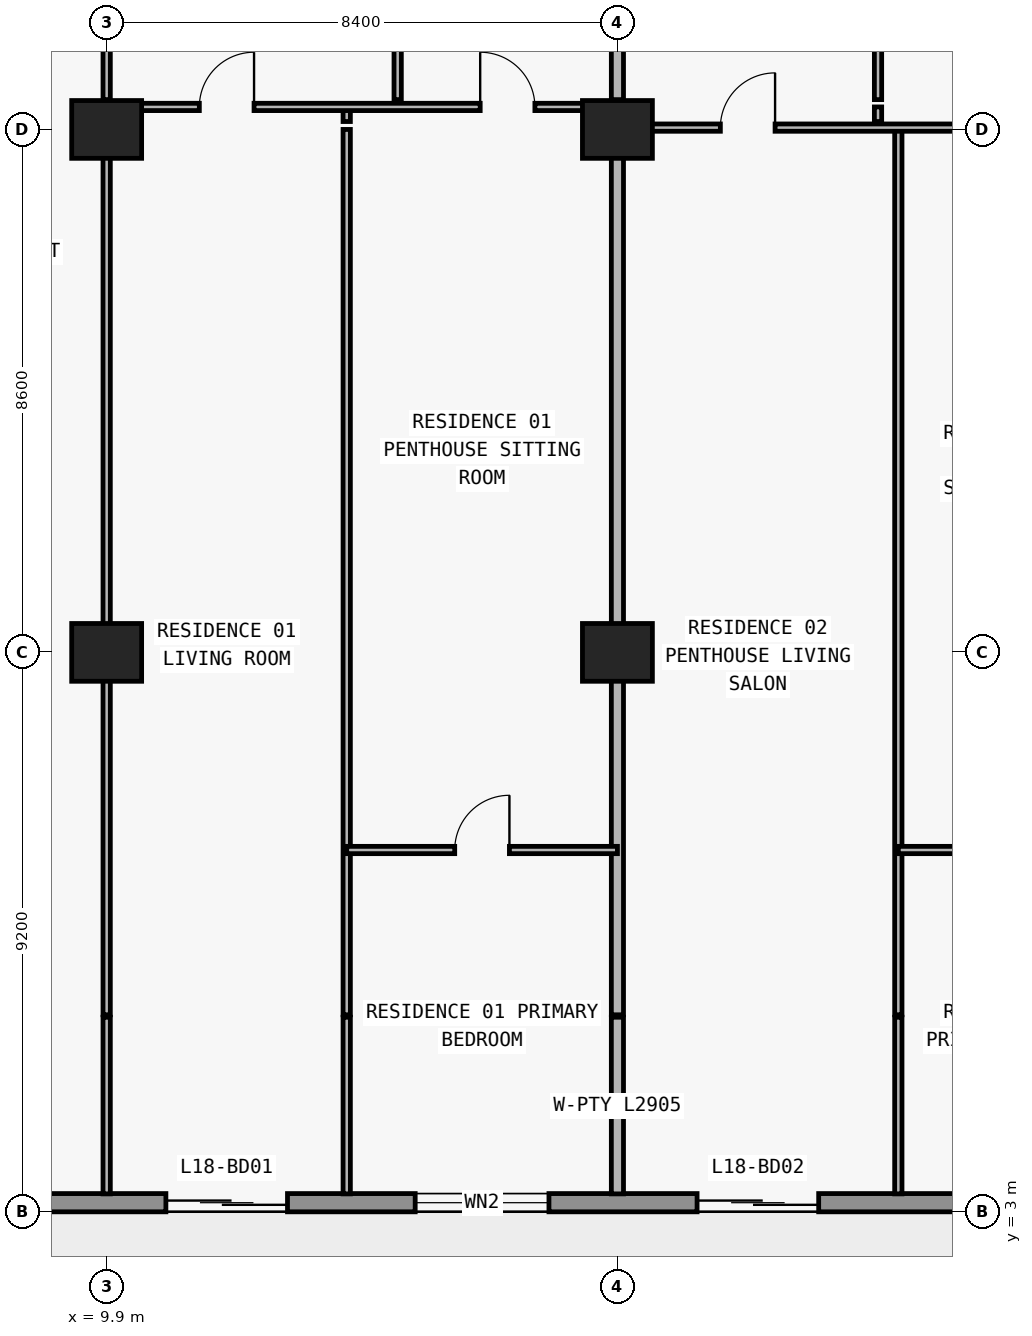
"""IFC4 building model, lengths in metres.
Left out: names, types, materials, properties, quantities, classifications, styles, units other than length and angle.
Written with IfcOpenShell. Run it as: python <this file> out.ifc"""

import sys

from ifc_helpers import new_model, si_unit, direction, frame, frame_2d, origin, origin_2d, place, context, subcontext, project, spatial, rectangle, extrude, element, fill, save


model = new_model("IFC4")
c1 = context("Model", 3, precision=1e-05, world=origin(), true_north=direction((0.0, 1.0)))
c2 = subcontext(c1, "Body", "Model", "MODEL_VIEW")
j1 = project(units=[si_unit("LENGTHUNIT", "METRE"), si_unit("PLANEANGLEUNIT", "RADIAN")], contexts=[c1])
p1 = place(None, origin())
s1 = spatial("IfcSite", under=j1, at=p1, CompositionType="ELEMENT")
p2 = place(p1, origin())
s2 = spatial("IfcBuilding", under=s1, at=p2, CompositionType="ELEMENT")
p3 = place(p2, frame((0.0, 0.0, 69.6)))
s3 = spatial("IfcBuildingStorey", under=s2, at=p3, CompositionType="ELEMENT", Elevation=69.6)
for number, where, z_axis, x_axis in (
    (1, (9.9, 12.2, 0.0), (0.0, 0.0, 1.0), (1.0, 0.0, 0.0)),
    (2, (18.3, 12.2, 0.0), (0.0, 0.0, 1.0), (1.0, 0.0, 0.0)),
    (3, (9.9, 20.8, 0.0), (0.0, 0.0, 1.0), (1.0, 0.0, 0.0)),
    (4, (18.3, 20.8, 0.0), (0.0, 0.0, 1.0), (1.0, 0.0, 0.0)),
):
    element("IfcColumn", number, at=place(p3, frame(where, z_axis=z_axis, x_axis=x_axis)), inside=s3, PredefinedType="COLUMN", context=c2, shape_type="SweptSolid", body=[
        extrude(rectangle(XDim=1.15, YDim=0.95, at=origin_2d()), origin(), (0.0, 0.0, 1.0), 3.05),
    ])
p4 = place(p3, frame((72.7, 3.15, 0.0), z_axis=(0.0, 0.0, 1.0), x_axis=(-1.0, 0.0, 0.0)))
e5 = element("IfcWall", 5, at=p4, inside=s3, PredefinedType="STANDARD", context=c2, shape_type="SweptSolid", body=[
    extrude(rectangle(XDim=67.6, YDim=0.3, at=frame_2d((33.8, 0.0))), origin(), (0.0, 0.0, 1.0), 3.05),
])
p5 = place(p4, frame((59.826, 0.0, 0.0)))
e6 = element("IfcOpeningElement", 6, at=p5, cuts=e5, PredefinedType="OPENING", context=c2, shape_type="SweptSolid", body=[
    extrude(rectangle(XDim=2.0, YDim=2.3, at=frame_2d((1.0, 1.15))), frame((0.0, 0.16, 0.0), z_axis=(0.0, -1.0, 0.0), x_axis=(1.0, 0.0, 0.0)), (0.0, 0.0, 1.0), 0.32),
])
p6 = place(p4, frame((55.526, 0.0, 0.85)))
e7 = element("IfcOpeningElement", 7, at=p6, cuts=e5, PredefinedType="OPENING", context=c2, shape_type="SweptSolid", body=[
    extrude(rectangle(XDim=2.2, YDim=1.55, at=frame_2d((1.1, 0.775))), frame((0.0, 0.16, 0.0), z_axis=(0.0, -1.0, 0.0), x_axis=(1.0, 0.0, 0.0)), (0.0, 0.0, 1.0), 0.32),
])
p7 = place(p4, frame((51.09, 0.0, 0.0)))
e8 = element("IfcOpeningElement", 8, at=p7, cuts=e5, PredefinedType="OPENING", context=c2, shape_type="SweptSolid", body=[
    extrude(rectangle(XDim=2.0, YDim=2.3, at=frame_2d((1.0, 1.15))), frame((0.0, 0.16, 0.0), z_axis=(0.0, -1.0, 0.0), x_axis=(1.0, 0.0, 0.0)), (0.0, 0.0, 1.0), 0.32),
])
p8 = place(p4, frame((46.99, 0.0, 0.85)))
e9 = element("IfcOpeningElement", 9, at=p8, cuts=e5, PredefinedType="OPENING", context=c2, shape_type="SweptSolid", body=[
    extrude(rectangle(XDim=1.8, YDim=1.55, at=frame_2d((0.9, 0.775))), frame((0.0, 0.16, 0.0), z_axis=(0.0, -1.0, 0.0), x_axis=(1.0, 0.0, 0.0)), (0.0, 0.0, 1.0), 0.32),
])
p9 = place(p4, frame((43.026, 0.0, 0.0)))
e10 = element("IfcOpeningElement", 10, at=p9, cuts=e5, PredefinedType="OPENING", context=c2, shape_type="SweptSolid", body=[
    extrude(rectangle(XDim=2.0, YDim=2.3, at=frame_2d((1.0, 1.15))), frame((0.0, 0.16, 0.0), z_axis=(0.0, -1.0, 0.0), x_axis=(1.0, 0.0, 0.0)), (0.0, 0.0, 1.0), 0.32),
])
p10 = place(p4, frame((38.726, 0.0, 0.85)))
e11 = element("IfcOpeningElement", 11, at=p10, cuts=e5, PredefinedType="OPENING", context=c2, shape_type="SweptSolid", body=[
    extrude(rectangle(XDim=2.2, YDim=1.55, at=frame_2d((1.1, 0.775))), frame((0.0, 0.16, 0.0), z_axis=(0.0, -1.0, 0.0), x_axis=(1.0, 0.0, 0.0)), (0.0, 0.0, 1.0), 0.32),
])
p11 = place(p4, frame((34.51, 0.0, 0.0)))
e12 = element("IfcOpeningElement", 12, at=p11, cuts=e5, PredefinedType="OPENING", context=c2, shape_type="SweptSolid", body=[
    extrude(rectangle(XDim=2.0, YDim=2.3, at=frame_2d((1.0, 1.15))), frame((0.0, 0.16, 0.0), z_axis=(0.0, -1.0, 0.0), x_axis=(1.0, 0.0, 0.0)), (0.0, 0.0, 1.0), 0.32),
])
p12 = place(p4, frame((30.81, 0.0, 0.85)))
e13 = element("IfcOpeningElement", 13, at=p12, cuts=e5, PredefinedType="OPENING", context=c2, shape_type="SweptSolid", body=[
    extrude(rectangle(XDim=1.8, YDim=1.55, at=frame_2d((0.9, 0.775))), frame((0.0, 0.16, 0.0), z_axis=(0.0, -1.0, 0.0), x_axis=(1.0, 0.0, 0.0)), (0.0, 0.0, 1.0), 0.32),
])
p13 = place(p4, frame((27.026, 0.0, 0.0)))
e14 = element("IfcOpeningElement", 14, at=p13, cuts=e5, PredefinedType="OPENING", context=c2, shape_type="SweptSolid", body=[
    extrude(rectangle(XDim=2.0, YDim=2.3, at=frame_2d((1.0, 1.15))), frame((0.0, 0.16, 0.0), z_axis=(0.0, -1.0, 0.0), x_axis=(1.0, 0.0, 0.0)), (0.0, 0.0, 1.0), 0.32),
])
p14 = place(p4, frame((22.726, 0.0, 0.85)))
e15 = element("IfcOpeningElement", 15, at=p14, cuts=e5, PredefinedType="OPENING", context=c2, shape_type="SweptSolid", body=[
    extrude(rectangle(XDim=2.2, YDim=1.55, at=frame_2d((1.1, 0.775))), frame((0.0, 0.16, 0.0), z_axis=(0.0, -1.0, 0.0), x_axis=(1.0, 0.0, 0.0)), (0.0, 0.0, 1.0), 0.32),
])
p15 = place(p4, frame((18.29, 0.0, 0.0)))
e16 = element("IfcOpeningElement", 16, at=p15, cuts=e5, PredefinedType="OPENING", context=c2, shape_type="SweptSolid", body=[
    extrude(rectangle(XDim=2.0, YDim=2.3, at=frame_2d((1.0, 1.15))), frame((0.0, 0.16, 0.0), z_axis=(0.0, -1.0, 0.0), x_axis=(1.0, 0.0, 0.0)), (0.0, 0.0, 1.0), 0.32),
])
p16 = place(p4, frame((14.19, 0.0, 0.85)))
e17 = element("IfcOpeningElement", 17, at=p16, cuts=e5, PredefinedType="OPENING", context=c2, shape_type="SweptSolid", body=[
    extrude(rectangle(XDim=1.8, YDim=1.55, at=frame_2d((0.9, 0.775))), frame((0.0, 0.16, 0.0), z_axis=(0.0, -1.0, 0.0), x_axis=(1.0, 0.0, 0.0)), (0.0, 0.0, 1.0), 0.32),
])
p17 = place(p4, frame((10.226, 0.0, 0.0)))
e18 = element("IfcOpeningElement", 18, at=p17, cuts=e5, PredefinedType="OPENING", context=c2, shape_type="SweptSolid", body=[
    extrude(rectangle(XDim=2.0, YDim=2.3, at=frame_2d((1.0, 1.15))), frame((0.0, 0.16, 0.0), z_axis=(0.0, -1.0, 0.0), x_axis=(1.0, 0.0, 0.0)), (0.0, 0.0, 1.0), 0.32),
])
p18 = place(p4, frame((5.926, 0.0, 0.85)))
e19 = element("IfcOpeningElement", 19, at=p18, cuts=e5, PredefinedType="OPENING", context=c2, shape_type="SweptSolid", body=[
    extrude(rectangle(XDim=2.2, YDim=1.55, at=frame_2d((1.1, 0.775))), frame((0.0, 0.16, 0.0), z_axis=(0.0, -1.0, 0.0), x_axis=(1.0, 0.0, 0.0)), (0.0, 0.0, 1.0), 0.32),
])
p19 = place(p3, frame((9.9, 3.295, 0.0), z_axis=(0.0, 0.0, 1.0), x_axis=(0.0, 1.0, 0.0)))
e20 = element("IfcWall", 20, at=p19, inside=s3, PredefinedType="PARTITIONING", context=c2, shape_type="SweptSolid", body=[
    extrude(rectangle(XDim=2.905, YDim=0.12, at=frame_2d((1.453, 0.0))), origin(), (0.0, 0.0, 1.0), 3.05),
])
p20 = place(p3, frame((9.9, 6.24, 0.0), z_axis=(0.0, 0.0, 1.0), x_axis=(0.0, 1.0, 0.0)))
e21 = element("IfcWall", 21, at=p20, inside=s3, PredefinedType="PARTITIONING", context=c2, shape_type="SweptSolid", body=[
    extrude(rectangle(XDim=14.56, YDim=0.12, at=frame_2d((7.28, 0.0))), origin(), (0.0, 0.0, 1.0), 2.11),
])
p21 = place(p3, frame((9.9, 20.93, 0.0), z_axis=(0.0, 0.0, 1.0), x_axis=(0.0, 1.0, 0.0)))
e22 = element("IfcWall", 22, at=p21, inside=s3, PredefinedType="PARTITIONING", context=c2, shape_type="SweptSolid", body=[
    extrude(rectangle(XDim=0.24, YDim=0.12, at=frame_2d((0.12, 0.0))), origin(), (0.0, 0.0, 1.0), 3.05),
])
p22 = place(p3, frame((9.9, 21.29, 0.0), z_axis=(0.0, 0.0, 1.0), x_axis=(0.0, 1.0, 0.0)))
e23 = element("IfcWall", 23, at=p22, inside=s3, PredefinedType="PARTITIONING", context=c2, shape_type="SweptSolid", body=[
    extrude(rectangle(XDim=4.69, YDim=0.12, at=frame_2d((2.345, 0.0))), origin(), (0.0, 0.0, 1.0), 2.11),
])
p23 = place(p22, frame((1.895, 0.0, 0.0)))
e24 = element("IfcOpeningElement", 24, at=p23, cuts=e23, PredefinedType="OPENING", context=c2, shape_type="SweptSolid", body=[
    extrude(rectangle(XDim=0.9, YDim=2.06, at=frame_2d((0.45, 1.03))), frame((0.0, 0.07, 0.0), z_axis=(0.0, -1.0, 0.0), x_axis=(1.0, 0.0, 0.0)), (0.0, 0.0, 1.0), 0.14),
])
p24 = place(p3, frame((13.848, 3.295, 0.0), z_axis=(0.0, 0.0, 1.0), x_axis=(0.0, 1.0, 0.0)))
e25 = element("IfcWall", 25, at=p24, inside=s3, PredefinedType="PARTITIONING", context=c2, shape_type="SweptSolid", body=[
    extrude(rectangle(XDim=2.905, YDim=0.12, at=frame_2d((1.453, 0.0))), origin(), (0.0, 0.0, 1.0), 3.05),
])
p25 = place(p3, frame((13.848, 6.24, 0.0), z_axis=(0.0, 0.0, 1.0), x_axis=(0.0, 1.0, 0.0)))
e26 = element("IfcWall", 26, at=p25, inside=s3, PredefinedType="PARTITIONING", context=c2, shape_type="SweptSolid", body=[
    extrude(rectangle(XDim=14.56, YDim=0.12, at=frame_2d((7.28, 0.0))), origin(), (0.0, 0.0, 1.0), 3.05),
])
p26 = place(p3, frame((13.848, 20.93, 0.0), z_axis=(0.0, 0.0, 1.0), x_axis=(0.0, 1.0, 0.0)))
e27 = element("IfcWall", 27, at=p26, inside=s3, PredefinedType="PARTITIONING", context=c2, shape_type="SweptSolid", body=[
    extrude(rectangle(XDim=0.24, YDim=0.12, at=frame_2d((0.12, 0.0))), origin(), (0.0, 0.0, 1.0), 3.05),
])
p27 = place(p3, frame((14.686, 21.29, 0.0), z_axis=(0.0, 0.0, 1.0), x_axis=(0.0, 1.0, 0.0)))
e28 = element("IfcWall", 28, at=p27, inside=s3, PredefinedType="PARTITIONING", context=c2, shape_type="SweptSolid", body=[
    extrude(rectangle(XDim=4.69, YDim=0.12, at=frame_2d((2.345, 0.0))), origin(), (0.0, 0.0, 1.0), 3.05),
])
p28 = place(p27, frame((1.895, 0.0, 0.0)))
e29 = element("IfcOpeningElement", 29, at=p28, cuts=e28, PredefinedType="OPENING", context=c2, shape_type="SweptSolid", body=[
    extrude(rectangle(XDim=0.9, YDim=2.15, at=frame_2d((0.45, 1.075))), frame((0.0, 0.07, 0.0), z_axis=(0.0, -1.0, 0.0), x_axis=(1.0, 0.0, 0.0)), (0.0, 0.0, 1.0), 0.14),
])
p29 = place(p3, frame((18.3, 3.295, 0.0), z_axis=(0.0, 0.0, 1.0), x_axis=(0.0, 1.0, 0.0)))
e30 = element("IfcWall", 30, at=p29, inside=s3, PredefinedType="PARTITIONING", context=c2, shape_type="SweptSolid", body=[
    extrude(rectangle(XDim=2.905, YDim=0.2, at=frame_2d((1.453, 0.0))), origin(), (0.0, 0.0, 1.0), 3.05),
])
p30 = place(p3, frame((18.3, 6.24, 0.0), z_axis=(0.0, 0.0, 1.0), x_axis=(0.0, 1.0, 0.0)))
e31 = element("IfcWall", 31, at=p30, inside=s3, PredefinedType="PARTITIONING", context=c2, shape_type="SweptSolid", body=[
    extrude(rectangle(XDim=14.56, YDim=0.2, at=frame_2d((7.28, 0.0))), origin(), (0.0, 0.0, 1.0), 2.11),
])
p31 = place(p3, frame((18.3, 20.93, 0.0), z_axis=(0.0, 0.0, 1.0), x_axis=(0.0, 1.0, 0.0)))
e32 = element("IfcWall", 32, at=p31, inside=s3, PredefinedType="PARTITIONING", context=c2, shape_type="SweptSolid", body=[
    extrude(rectangle(XDim=0.24, YDim=0.2, at=frame_2d((0.12, 0.0))), origin(), (0.0, 0.0, 1.0), 3.05),
])
p32 = place(p3, frame((18.3, 21.29, 0.0), z_axis=(0.0, 0.0, 1.0), x_axis=(0.0, 1.0, 0.0)))
e33 = element("IfcWall", 33, at=p32, inside=s3, PredefinedType="PARTITIONING", context=c2, shape_type="SweptSolid", body=[
    extrude(rectangle(XDim=4.69, YDim=0.2, at=frame_2d((2.345, 0.0))), origin(), (0.0, 0.0, 1.0), 2.11),
])
p33 = place(p3, frame((22.586, 20.93, 0.0), z_axis=(0.0, 0.0, 1.0), x_axis=(0.0, 1.0, 0.0)))
e34 = element("IfcWall", 34, at=p33, inside=s3, PredefinedType="PARTITIONING", context=c2, shape_type="SweptSolid", body=[
    extrude(rectangle(XDim=0.24, YDim=0.12, at=frame_2d((0.12, 0.0))), origin(), (0.0, 0.0, 1.0), 3.05),
])
p34 = place(p3, frame((22.586, 21.29, 0.0), z_axis=(0.0, 0.0, 1.0), x_axis=(0.0, 1.0, 0.0)))
e35 = element("IfcWall", 35, at=p34, inside=s3, PredefinedType="PARTITIONING", context=c2, shape_type="SweptSolid", body=[
    extrude(rectangle(XDim=4.69, YDim=0.12, at=frame_2d((2.345, 0.0))), origin(), (0.0, 0.0, 1.0), 3.05),
])
p35 = place(p34, frame((1.895, 0.0, 0.0)))
e36 = element("IfcOpeningElement", 36, at=p35, cuts=e35, PredefinedType="OPENING", context=c2, shape_type="SweptSolid", body=[
    extrude(rectangle(XDim=0.9, YDim=2.15, at=frame_2d((0.45, 1.075))), frame((0.0, 0.07, 0.0), z_axis=(0.0, -1.0, 0.0), x_axis=(1.0, 0.0, 0.0)), (0.0, 0.0, 1.0), 0.14),
])
p36 = place(p3, frame((22.92, 3.295, 0.0), z_axis=(0.0, 0.0, 1.0), x_axis=(0.0, 1.0, 0.0)))
e37 = element("IfcWall", 37, at=p36, inside=s3, PredefinedType="PARTITIONING", context=c2, shape_type="SweptSolid", body=[
    extrude(rectangle(XDim=2.905, YDim=0.12, at=frame_2d((1.453, 0.0))), origin(), (0.0, 0.0, 1.0), 3.05),
])
p37 = place(p3, frame((22.92, 6.24, 0.0), z_axis=(0.0, 0.0, 1.0), x_axis=(0.0, 1.0, 0.0)))
e38 = element("IfcWall", 38, at=p37, inside=s3, PredefinedType="PARTITIONING", context=c2, shape_type="SweptSolid", body=[
    extrude(rectangle(XDim=14.56, YDim=0.12, at=frame_2d((7.28, 0.0))), origin(), (0.0, 0.0, 1.0), 3.05),
])
p38 = place(p3, frame((13.848, 8.95, 0.0), z_axis=(0.0, 0.0, 1.0), x_axis=(1.0, 0.0, 0.0)))
e39 = element("IfcWall", 39, at=p38, inside=s3, PredefinedType="PARTITIONING", context=c2, shape_type="SweptSolid", body=[
    extrude(rectangle(XDim=4.452, YDim=0.12, at=frame_2d((2.226, 0.0))), origin(), (0.0, 0.0, 1.0), 3.05),
])
p39 = place(p38, frame((1.776, 0.0, 0.0)))
e40 = element("IfcOpeningElement", 40, at=p39, cuts=e39, PredefinedType="OPENING", context=c2, shape_type="SweptSolid", body=[
    extrude(rectangle(XDim=0.9, YDim=2.15, at=frame_2d((0.45, 1.075))), frame((0.0, 0.07, 0.0), z_axis=(0.0, -1.0, 0.0), x_axis=(1.0, 0.0, 0.0)), (0.0, 0.0, 1.0), 0.14),
])
p40 = place(p3, frame((22.92, 8.95, 0.0), z_axis=(0.0, 0.0, 1.0), x_axis=(1.0, 0.0, 0.0)))
e41 = element("IfcWall", 41, at=p40, inside=s3, PredefinedType="PARTITIONING", context=c2, shape_type="SweptSolid", body=[
    extrude(rectangle(XDim=3.78, YDim=0.12, at=frame_2d((1.89, 0.0))), origin(), (0.0, 0.0, 1.0), 3.05),
])
p41 = place(p40, frame((1.44, 0.0, 0.0)))
e42 = element("IfcOpeningElement", 42, at=p41, cuts=e41, PredefinedType="OPENING", context=c2, shape_type="SweptSolid", body=[
    extrude(rectangle(XDim=0.9, YDim=2.15, at=frame_2d((0.45, 1.075))), frame((0.0, 0.07, 0.0), z_axis=(0.0, -1.0, 0.0), x_axis=(1.0, 0.0, 0.0)), (0.0, 0.0, 1.0), 0.14),
])
p42 = place(p3, frame((18.3, 20.83, 0.0), z_axis=(0.0, 0.0, 1.0), x_axis=(1.0, 0.0, 0.0)))
e43 = element("IfcWall", 43, at=p42, inside=s3, PredefinedType="PARTITIONING", context=c2, shape_type="SweptSolid", body=[
    extrude(rectangle(XDim=8.13, YDim=0.12, at=frame_2d((4.065, 0.0))), origin(), (0.0, 0.0, 1.0), 2.11),
])
p43 = place(p42, frame((1.693, 0.0, 0.0)))
e44 = element("IfcOpeningElement", 44, at=p43, cuts=e43, PredefinedType="OPENING", context=c2, shape_type="SweptSolid", body=[
    extrude(rectangle(XDim=0.9, YDim=2.06, at=frame_2d((0.45, 1.03))), frame((0.0, 0.07, 0.0), z_axis=(0.0, -1.0, 0.0), x_axis=(1.0, 0.0, 0.0)), (0.0, 0.0, 1.0), 0.14),
])
p44 = place(p42, frame((5.925, 0.0, 0.0)))
e45 = element("IfcOpeningElement", 45, at=p44, cuts=e43, PredefinedType="OPENING", context=c2, shape_type="SweptSolid", body=[
    extrude(rectangle(XDim=0.9, YDim=2.06, at=frame_2d((0.45, 1.03))), frame((0.0, 0.07, 0.0), z_axis=(0.0, -1.0, 0.0), x_axis=(1.0, 0.0, 0.0)), (0.0, 0.0, 1.0), 0.14),
])
p45 = place(p3, frame((9.9, 21.17, 0.0), z_axis=(0.0, 0.0, 1.0), x_axis=(1.0, 0.0, 0.0)))
e46 = element("IfcWall", 46, at=p45, inside=s3, PredefinedType="PARTITIONING", context=c2, shape_type="SweptSolid", body=[
    extrude(rectangle(XDim=8.4, YDim=0.12, at=frame_2d((4.2, 0.0))), origin(), (0.0, 0.0, 1.0), 3.05),
])
p46 = place(p45, frame((1.524, 0.0, 0.0)))
e47 = element("IfcOpeningElement", 47, at=p46, cuts=e46, PredefinedType="OPENING", context=c2, shape_type="SweptSolid", body=[
    extrude(rectangle(XDim=0.9, YDim=2.15, at=frame_2d((0.45, 1.075))), frame((0.0, 0.07, 0.0), z_axis=(0.0, -1.0, 0.0), x_axis=(1.0, 0.0, 0.0)), (0.0, 0.0, 1.0), 0.14),
])
p47 = place(p45, frame((6.143, 0.0, 0.0)))
e48 = element("IfcOpeningElement", 48, at=p47, cuts=e46, PredefinedType="OPENING", context=c2, shape_type="SweptSolid", body=[
    extrude(rectangle(XDim=0.9, YDim=2.15, at=frame_2d((0.45, 1.075))), frame((0.0, 0.07, 0.0), z_axis=(0.0, -1.0, 0.0), x_axis=(1.0, 0.0, 0.0)), (0.0, 0.0, 1.0), 0.14),
])
p48 = place(p5, origin())
e49 = element("IfcDoor", 49, at=p48, inside=s3, OperationType="DOUBLE_DOOR_SLIDING", PredefinedType="DOOR", context=c2, shape_type="SweptSolid", body=[
    extrude(rectangle(XDim=2.0, YDim=2.3, at=frame_2d((1.0, 1.15))), frame((0.0, 0.025, 0.0), z_axis=(0.0, -1.0, 0.0), x_axis=(1.0, 0.0, 0.0)), (0.0, 0.0, 1.0), 0.05),
])
fill(e6, e49)
p49 = place(p6, origin())
e50 = element("IfcWindow", 50, at=p49, inside=s3, PartitioningType="SINGLE_PANEL", PredefinedType="WINDOW", context=c2, shape_type="SweptSolid", body=[
    extrude(rectangle(XDim=2.2, YDim=1.55, at=frame_2d((1.1, 0.775))), frame((0.0, 0.03, 0.0), z_axis=(0.0, -1.0, 0.0), x_axis=(1.0, 0.0, 0.0)), (0.0, 0.0, 1.0), 0.06),
])
fill(e7, e50)
p50 = place(p7, origin())
e51 = element("IfcDoor", 51, at=p50, inside=s3, OperationType="DOUBLE_DOOR_SLIDING", PredefinedType="DOOR", context=c2, shape_type="SweptSolid", body=[
    extrude(rectangle(XDim=2.0, YDim=2.3, at=frame_2d((1.0, 1.15))), frame((0.0, 0.025, 0.0), z_axis=(0.0, -1.0, 0.0), x_axis=(1.0, 0.0, 0.0)), (0.0, 0.0, 1.0), 0.05),
])
fill(e8, e51)
p51 = place(p46, origin())
e52 = element("IfcDoor", 52, at=p51, inside=s3, OperationType="SINGLE_SWING_RIGHT", PredefinedType="DOOR", context=c2, shape_type="SweptSolid", body=[
    extrude(rectangle(XDim=0.9, YDim=2.15, at=frame_2d((0.45, 1.075))), frame((0.0, 0.025, 0.0), z_axis=(0.0, -1.0, 0.0), x_axis=(1.0, 0.0, 0.0)), (0.0, 0.0, 1.0), 0.05),
])
fill(e47, e52)
p52 = place(p47, origin())
e53 = element("IfcDoor", 53, at=p52, inside=s3, OperationType="SINGLE_SWING_LEFT", PredefinedType="DOOR", context=c2, shape_type="SweptSolid", body=[
    extrude(rectangle(XDim=0.9, YDim=2.15, at=frame_2d((0.45, 1.075))), frame((0.0, 0.025, 0.0), z_axis=(0.0, -1.0, 0.0), x_axis=(1.0, 0.0, 0.0)), (0.0, 0.0, 1.0), 0.05),
])
fill(e48, e53)
p53 = place(p39, origin())
e54 = element("IfcDoor", 54, at=p53, inside=s3, OperationType="SINGLE_SWING_RIGHT", PredefinedType="DOOR", context=c2, shape_type="SweptSolid", body=[
    extrude(rectangle(XDim=0.9, YDim=2.15, at=frame_2d((0.45, 1.075))), frame((0.0, 0.025, 0.0), z_axis=(0.0, -1.0, 0.0), x_axis=(1.0, 0.0, 0.0)), (0.0, 0.0, 1.0), 0.05),
])
fill(e40, e54)
p54 = place(p43, origin())
e55 = element("IfcDoor", 55, at=p54, inside=s3, OperationType="SINGLE_SWING_RIGHT", PredefinedType="DOOR", context=c2, shape_type="SweptSolid", body=[
    extrude(rectangle(XDim=0.9, YDim=2.06, at=frame_2d((0.45, 1.03))), frame((0.0, 0.025, 0.0), z_axis=(0.0, -1.0, 0.0), x_axis=(1.0, 0.0, 0.0)), (0.0, 0.0, 1.0), 0.05),
])
fill(e44, e55)
save(model, sys.argv[1])
